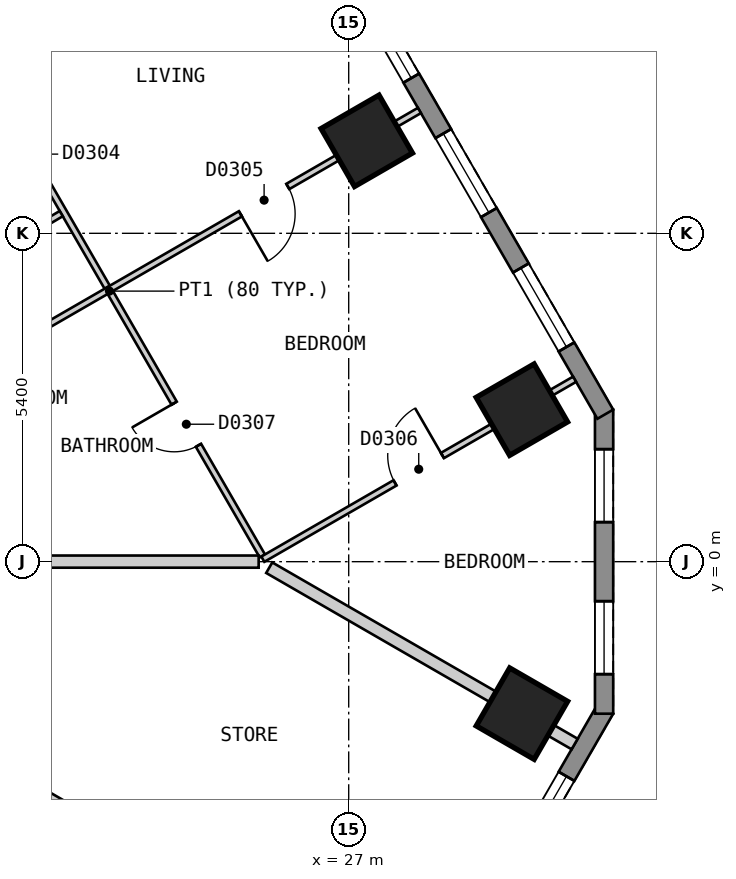
"""IFC4 building model, lengths in metres.
Left out: names, types, materials, properties, quantities, classifications, styles, units other than length and angle.
Written with IfcOpenShell. Run it as: python <this file> out.ifc"""

import sys

from ifc_helpers import new_model, si_unit, direction, frame, frame_2d, origin, origin_2d, place, context, subcontext, project, spatial, polyline, rectangle, outline, extrude, element, fill, save


model = new_model("IFC4")
c1 = context("Model", 3, precision=1e-05, world=origin(), true_north=direction((0.0, 1.0)))
c2 = subcontext(c1, "Body", "Model", "MODEL_VIEW")
j1 = project(units=[si_unit("LENGTHUNIT", "METRE"), si_unit("PLANEANGLEUNIT", "RADIAN")], contexts=[c1])
p1 = place(None, origin())
s1 = spatial("IfcSite", under=j1, at=p1, CompositionType="ELEMENT")
p2 = place(p1, origin())
s2 = spatial("IfcBuilding", under=s1, at=p2, CompositionType="ELEMENT")
p3 = place(p2, frame((0.0, 0.0, 59.4)))
s3 = spatial("IfcBuildingStorey", under=s2, at=p3, CompositionType="ELEMENT", Elevation=59.4)
for number, where, z_axis, x_axis in (
    (1, (29.849, -2.499, 0.0), (0.0, 0.0, 1.0), (0.5, 0.866, 0.0)),
    (2, (29.848, 2.5, 0.0), (0.0, 0.0, 1.0), (-0.5, 0.866, 0.0)),
    (3, (27.297, 6.921, 0.0), (0.0, 0.0, 1.0), (-0.5, 0.866, 0.0)),
):
    element("IfcColumn", number, at=place(p3, frame(where, z_axis=z_axis, x_axis=x_axis)), inside=s3, PredefinedType="COLUMN", context=c2, shape_type="SweptSolid", body=[
        extrude(rectangle(XDim=1.1, YDim=1.1, at=origin_2d()), origin(), (0.0, 0.0, 1.0), 3.0),
    ])
p4 = place(p3, frame((17.71, -25.825, 0.0), z_axis=(0.0, 0.0, 1.0), x_axis=(0.500001938803, 0.866024284413, 0.0)))
e4 = element("IfcWall", 4, at=p4, inside=s3, PredefinedType="SOLIDWALL", context=c2, shape_type="SweptSolid", body=[
    extrude(outline(polyline([(0.0, -0.15), (27.02, -0.15), (26.94, 0.15), (0.08, 0.15), (0.0, -0.15)])), origin(), (0.0, 0.0, 1.0), 2.6),
])
p5 = place(p4, frame((1.277, 0.0, 0.15)))
e5 = element("IfcOpeningElement", 5, at=p5, cuts=e4, PredefinedType="OPENING", context=c2, shape_type="SweptSolid", body=[
    extrude(rectangle(XDim=1.5, YDim=2.1, at=frame_2d((0.75, 1.05))), frame((0.0, 0.16, 0.0), z_axis=(0.0, -1.0, 0.0), x_axis=(1.0, 0.0, 0.0)), (0.0, 0.0, 1.0), 0.32),
])
p6 = place(p4, frame((3.829, 0.0, 0.15)))
e6 = element("IfcOpeningElement", 6, at=p6, cuts=e4, PredefinedType="OPENING", context=c2, shape_type="SweptSolid", body=[
    extrude(rectangle(XDim=1.5, YDim=2.1, at=frame_2d((0.75, 1.05))), frame((0.0, 0.16, 0.0), z_axis=(0.0, -1.0, 0.0), x_axis=(1.0, 0.0, 0.0)), (0.0, 0.0, 1.0), 0.32),
])
p7 = place(p4, frame((6.382, 0.0, 0.15)))
e7 = element("IfcOpeningElement", 7, at=p7, cuts=e4, PredefinedType="OPENING", context=c2, shape_type="SweptSolid", body=[
    extrude(rectangle(XDim=1.5, YDim=2.1, at=frame_2d((0.75, 1.05))), frame((0.0, 0.16, 0.0), z_axis=(0.0, -1.0, 0.0), x_axis=(1.0, 0.0, 0.0)), (0.0, 0.0, 1.0), 0.32),
])
p8 = place(p4, frame((8.933, 0.0, 0.15)))
e8 = element("IfcOpeningElement", 8, at=p8, cuts=e4, PredefinedType="OPENING", context=c2, shape_type="SweptSolid", body=[
    extrude(rectangle(XDim=1.5, YDim=2.1, at=frame_2d((0.75, 1.05))), frame((0.0, 0.16, 0.0), z_axis=(0.0, -1.0, 0.0), x_axis=(1.0, 0.0, 0.0)), (0.0, 0.0, 1.0), 0.32),
])
p9 = place(p4, frame((11.485, 0.0, 0.15)))
e9 = element("IfcOpeningElement", 9, at=p9, cuts=e4, PredefinedType="OPENING", context=c2, shape_type="SweptSolid", body=[
    extrude(rectangle(XDim=1.5, YDim=2.1, at=frame_2d((0.75, 1.05))), frame((0.0, 0.16, 0.0), z_axis=(0.0, -1.0, 0.0), x_axis=(1.0, 0.0, 0.0)), (0.0, 0.0, 1.0), 0.32),
])
p10 = place(p4, frame((14.037, 0.0, 0.15)))
e10 = element("IfcOpeningElement", 10, at=p10, cuts=e4, PredefinedType="OPENING", context=c2, shape_type="SweptSolid", body=[
    extrude(rectangle(XDim=1.5, YDim=2.1, at=frame_2d((0.75, 1.05))), frame((0.0, 0.16, 0.0), z_axis=(0.0, -1.0, 0.0), x_axis=(1.0, 0.0, 0.0)), (0.0, 0.0, 1.0), 0.32),
])
p11 = place(p4, frame((16.589, 0.0, 0.15)))
e11 = element("IfcOpeningElement", 11, at=p11, cuts=e4, PredefinedType="OPENING", context=c2, shape_type="SweptSolid", body=[
    extrude(rectangle(XDim=1.5, YDim=2.1, at=frame_2d((0.75, 1.05))), frame((0.0, 0.16, 0.0), z_axis=(0.0, -1.0, 0.0), x_axis=(1.0, 0.0, 0.0)), (0.0, 0.0, 1.0), 0.32),
])
p12 = place(p4, frame((19.141, 0.0, 0.15)))
e12 = element("IfcOpeningElement", 12, at=p12, cuts=e4, PredefinedType="OPENING", context=c2, shape_type="SweptSolid", body=[
    extrude(rectangle(XDim=1.5, YDim=2.1, at=frame_2d((0.75, 1.05))), frame((0.0, 0.16, 0.0), z_axis=(0.0, -1.0, 0.0), x_axis=(1.0, 0.0, 0.0)), (0.0, 0.0, 1.0), 0.32),
])
p13 = place(p4, frame((21.693, 0.0, 0.15)))
e13 = element("IfcOpeningElement", 13, at=p13, cuts=e4, PredefinedType="OPENING", context=c2, shape_type="SweptSolid", body=[
    extrude(rectangle(XDim=1.5, YDim=2.1, at=frame_2d((0.75, 1.05))), frame((0.0, 0.16, 0.0), z_axis=(0.0, -1.0, 0.0), x_axis=(1.0, 0.0, 0.0)), (0.0, 0.0, 1.0), 0.32),
])
p14 = place(p4, frame((24.244, 0.0, 0.15)))
e14 = element("IfcOpeningElement", 14, at=p14, cuts=e4, PredefinedType="OPENING", context=c2, shape_type="SweptSolid", body=[
    extrude(rectangle(XDim=1.5, YDim=2.1, at=frame_2d((0.75, 1.05))), frame((0.0, 0.16, 0.0), z_axis=(0.0, -1.0, 0.0), x_axis=(1.0, 0.0, 0.0)), (0.0, 0.0, 1.0), 0.32),
])
p15 = place(p3, frame((31.2, -2.5, 0.0), z_axis=(0.0, 0.0, 1.0), x_axis=(0.0, 1.0, 0.0)))
e15 = element("IfcWall", 15, at=p15, inside=s3, PredefinedType="SOLIDWALL", context=c2, shape_type="SweptSolid", body=[
    extrude(outline(polyline([(0.0, -0.15), (5.0, -0.15), (4.92, 0.15), (0.08, 0.15), (0.0, -0.15)])), origin(), (0.0, 0.0, 1.0), 2.6),
])
p16 = place(p15, frame((0.65, 0.0, 0.15)))
e16 = element("IfcOpeningElement", 16, at=p16, cuts=e15, PredefinedType="OPENING", context=c2, shape_type="SweptSolid", body=[
    extrude(rectangle(XDim=1.2, YDim=2.1, at=frame_2d((0.6, 1.05))), frame((0.0, 0.16, 0.0), z_axis=(0.0, -1.0, 0.0), x_axis=(1.0, 0.0, 0.0)), (0.0, 0.0, 1.0), 0.32),
])
p17 = place(p15, frame((3.15, 0.0, 0.15)))
e17 = element("IfcOpeningElement", 17, at=p17, cuts=e15, PredefinedType="OPENING", context=c2, shape_type="SweptSolid", body=[
    extrude(rectangle(XDim=1.2, YDim=2.1, at=frame_2d((0.6, 1.05))), frame((0.0, 0.16, 0.0), z_axis=(0.0, -1.0, 0.0), x_axis=(1.0, 0.0, 0.0)), (0.0, 0.0, 1.0), 0.32),
])
p18 = place(p3, frame((31.22, 2.425, 0.0), z_axis=(0.0, 0.0, 1.0), x_axis=(-0.500001938803, 0.866024284413, 0.0)))
e18 = element("IfcWall", 18, at=p18, inside=s3, PredefinedType="SOLIDWALL", context=c2, shape_type="SweptSolid", body=[
    extrude(outline(polyline([(0.0, -0.15), (27.02, -0.15), (26.94, 0.15), (0.08, 0.15), (0.0, -0.15)])), origin(), (0.0, 0.0, 1.0), 2.6),
])
p19 = place(p18, frame((1.277, 0.0, 0.15)))
e19 = element("IfcOpeningElement", 19, at=p19, cuts=e18, PredefinedType="OPENING", context=c2, shape_type="SweptSolid", body=[
    extrude(rectangle(XDim=1.5, YDim=2.1, at=frame_2d((0.75, 1.05))), frame((0.0, 0.16, 0.0), z_axis=(0.0, -1.0, 0.0), x_axis=(1.0, 0.0, 0.0)), (0.0, 0.0, 1.0), 0.32),
])
p20 = place(p18, frame((3.829, 0.0, 0.15)))
e20 = element("IfcOpeningElement", 20, at=p20, cuts=e18, PredefinedType="OPENING", context=c2, shape_type="SweptSolid", body=[
    extrude(rectangle(XDim=1.5, YDim=2.1, at=frame_2d((0.75, 1.05))), frame((0.0, 0.16, 0.0), z_axis=(0.0, -1.0, 0.0), x_axis=(1.0, 0.0, 0.0)), (0.0, 0.0, 1.0), 0.32),
])
p21 = place(p18, frame((6.382, 0.0, 0.15)))
e21 = element("IfcOpeningElement", 21, at=p21, cuts=e18, PredefinedType="OPENING", context=c2, shape_type="SweptSolid", body=[
    extrude(rectangle(XDim=1.5, YDim=2.1, at=frame_2d((0.75, 1.05))), frame((0.0, 0.16, 0.0), z_axis=(0.0, -1.0, 0.0), x_axis=(1.0, 0.0, 0.0)), (0.0, 0.0, 1.0), 0.32),
])
p22 = place(p18, frame((8.933, 0.0, 0.15)))
e22 = element("IfcOpeningElement", 22, at=p22, cuts=e18, PredefinedType="OPENING", context=c2, shape_type="SweptSolid", body=[
    extrude(rectangle(XDim=1.5, YDim=2.1, at=frame_2d((0.75, 1.05))), frame((0.0, 0.16, 0.0), z_axis=(0.0, -1.0, 0.0), x_axis=(1.0, 0.0, 0.0)), (0.0, 0.0, 1.0), 0.32),
])
p23 = place(p18, frame((11.485, 0.0, 0.15)))
e23 = element("IfcOpeningElement", 23, at=p23, cuts=e18, PredefinedType="OPENING", context=c2, shape_type="SweptSolid", body=[
    extrude(rectangle(XDim=1.5, YDim=2.1, at=frame_2d((0.75, 1.05))), frame((0.0, 0.16, 0.0), z_axis=(0.0, -1.0, 0.0), x_axis=(1.0, 0.0, 0.0)), (0.0, 0.0, 1.0), 0.32),
])
p24 = place(p18, frame((14.037, 0.0, 0.15)))
e24 = element("IfcOpeningElement", 24, at=p24, cuts=e18, PredefinedType="OPENING", context=c2, shape_type="SweptSolid", body=[
    extrude(rectangle(XDim=1.5, YDim=2.1, at=frame_2d((0.75, 1.05))), frame((0.0, 0.16, 0.0), z_axis=(0.0, -1.0, 0.0), x_axis=(1.0, 0.0, 0.0)), (0.0, 0.0, 1.0), 0.32),
])
p25 = place(p18, frame((16.589, 0.0, 0.15)))
e25 = element("IfcOpeningElement", 25, at=p25, cuts=e18, PredefinedType="OPENING", context=c2, shape_type="SweptSolid", body=[
    extrude(rectangle(XDim=1.5, YDim=2.1, at=frame_2d((0.75, 1.05))), frame((0.0, 0.16, 0.0), z_axis=(0.0, -1.0, 0.0), x_axis=(1.0, 0.0, 0.0)), (0.0, 0.0, 1.0), 0.32),
])
p26 = place(p18, frame((19.141, 0.0, 0.15)))
e26 = element("IfcOpeningElement", 26, at=p26, cuts=e18, PredefinedType="OPENING", context=c2, shape_type="SweptSolid", body=[
    extrude(rectangle(XDim=1.5, YDim=2.1, at=frame_2d((0.75, 1.05))), frame((0.0, 0.16, 0.0), z_axis=(0.0, -1.0, 0.0), x_axis=(1.0, 0.0, 0.0)), (0.0, 0.0, 1.0), 0.32),
])
p27 = place(p18, frame((21.693, 0.0, 0.15)))
e27 = element("IfcOpeningElement", 27, at=p27, cuts=e18, PredefinedType="OPENING", context=c2, shape_type="SweptSolid", body=[
    extrude(rectangle(XDim=1.5, YDim=2.1, at=frame_2d((0.75, 1.05))), frame((0.0, 0.16, 0.0), z_axis=(0.0, -1.0, 0.0), x_axis=(1.0, 0.0, 0.0)), (0.0, 0.0, 1.0), 0.32),
])
p28 = place(p18, frame((24.244, 0.0, 0.15)))
e28 = element("IfcOpeningElement", 28, at=p28, cuts=e18, PredefinedType="OPENING", context=c2, shape_type="SweptSolid", body=[
    extrude(rectangle(XDim=1.5, YDim=2.1, at=frame_2d((0.75, 1.05))), frame((0.0, 0.16, 0.0), z_axis=(0.0, -1.0, 0.0), x_axis=(1.0, 0.0, 0.0)), (0.0, 0.0, 1.0), 0.32),
])
p29 = place(p3, frame((20.551, 8.805, 0.0), z_axis=(0.0, 0.0, 1.0), x_axis=(0.499984387913, -0.86603441724, 0.0)))
e29 = element("IfcWall", 29, at=p29, inside=s3, PredefinedType="PARTITIONING", context=c2, shape_type="SweptSolid", body=[
    extrude(rectangle(XDim=10.058, YDim=0.1, at=frame_2d((5.029, 0.0))), origin(), (0.0, 0.0, 1.0), 2.6),
])
p30 = place(p29, frame((1.978, 0.0, 0.0)))
e30 = element("IfcOpeningElement", 30, at=p30, cuts=e29, PredefinedType="OPENING", context=c2, shape_type="SweptSolid", body=[
    extrude(rectangle(XDim=0.9, YDim=2.1, at=frame_2d((0.45, 1.05))), frame((0.0, 0.06, 0.0), z_axis=(0.0, -1.0, 0.0), x_axis=(1.0, 0.0, 0.0)), (0.0, 0.0, 1.0), 0.12),
])
p31 = place(p29, frame((7.157, 0.0, 0.0)))
e31 = element("IfcOpeningElement", 31, at=p31, cuts=e29, PredefinedType="OPENING", context=c2, shape_type="SweptSolid", body=[
    extrude(rectangle(XDim=0.8, YDim=2.1, at=frame_2d((0.4, 1.05))), frame((0.0, 0.06, 0.0), z_axis=(0.0, -1.0, 0.0), x_axis=(1.0, 0.0, 0.0)), (0.0, 0.0, 1.0), 0.12),
])
p32 = place(p3, frame((19.503, 2.421, 0.0), z_axis=(0.0, 0.0, 1.0), x_axis=(0.866083434238, 0.499899474834, 0.0)))
e32 = element("IfcWall", 32, at=p32, inside=s3, PredefinedType="PARTITIONING", context=c2, shape_type="SweptSolid", body=[
    extrude(rectangle(XDim=4.099, YDim=0.1, at=frame_2d((2.049, 0.0))), origin(), (0.0, 0.0, 1.0), 2.6),
])
p33 = place(p3, frame((25.588, 0.041, 0.0), z_axis=(0.0, 0.0, 1.0), x_axis=(0.866113484451, 0.499847408768, 0.0)))
e33 = element("IfcWall", 33, at=p33, inside=s3, PredefinedType="PARTITIONING", context=c2, shape_type="SweptSolid", body=[
    extrude(rectangle(XDim=5.92, YDim=0.1, at=frame_2d((2.96, 0.0))), origin(), (0.0, 0.0, 1.0), 2.6),
])
p34 = place(p33, frame((2.51, 0.0, 0.0)))
e34 = element("IfcOpeningElement", 34, at=p34, cuts=e33, PredefinedType="OPENING", context=c2, shape_type="SweptSolid", body=[
    extrude(rectangle(XDim=0.9, YDim=2.1, at=frame_2d((0.45, 1.05))), frame((0.0, 0.06, 0.0), z_axis=(0.0, -1.0, 0.0), x_axis=(1.0, 0.0, 0.0)), (0.0, 0.0, 1.0), 0.12),
])
p35 = place(p3, frame((18.788, 3.658, 0.0), z_axis=(0.0, 0.0, 1.0), x_axis=(0.860114269096, 0.510101405701, 0.0)))
e35 = element("IfcWall", 35, at=p35, inside=s3, PredefinedType="PARTITIONING", context=c2, shape_type="SweptSolid", body=[
    extrude(rectangle(XDim=4.051, YDim=0.1, at=frame_2d((2.025, 0.0))), origin(), (0.0, 0.0, 1.0), 2.6),
])
p36 = place(p35, frame((1.6, 0.0, 0.0)))
e36 = element("IfcOpeningElement", 36, at=p36, cuts=e35, PredefinedType="OPENING", context=c2, shape_type="SweptSolid", body=[
    extrude(rectangle(XDim=0.8, YDim=2.1, at=frame_2d((0.4, 1.05))), frame((0.0, 0.06, 0.0), z_axis=(0.0, -1.0, 0.0), x_axis=(1.0, 0.0, 0.0)), (0.0, 0.0, 1.0), 0.12),
])
p37 = place(p3, frame((19.503, -2.419, 0.0), z_axis=(0.0, 0.0, 1.0), x_axis=(0.866047370643, -0.499961950354, 0.0)))
e37 = element("IfcWall", 37, at=p37, inside=s3, PredefinedType="PARTITIONING", context=c2, shape_type="SweptSolid", body=[
    extrude(rectangle(XDim=10.001, YDim=0.2, at=frame_2d((5.0, 0.0))), origin(), (0.0, 0.0, 1.0), 2.6),
])
p38 = place(p3, frame((25.693, -0.099, 0.0), z_axis=(0.0, 0.0, 1.0), x_axis=(0.866032775405, -0.499987231761, 0.0)))
e38 = element("IfcWall", 38, at=p38, inside=s3, PredefinedType="PARTITIONING", context=c2, shape_type="SweptSolid", body=[
    extrude(rectangle(XDim=5.8, YDim=0.2, at=frame_2d((2.9, 0.0))), origin(), (0.0, 0.0, 1.0), 2.6),
])
p39 = place(p3, frame((20.784, 0.001, 0.0), z_axis=(0.0, 0.0, 1.0), x_axis=(1.0, 0.0, 0.0)))
e39 = element("IfcWall", 39, at=p39, inside=s3, PredefinedType="PARTITIONING", context=c2, shape_type="SweptSolid", body=[
    extrude(rectangle(XDim=4.735, YDim=0.2, at=frame_2d((2.368, 0.0))), origin(), (0.0, 0.0, 1.0), 2.6),
])
p40 = place(p3, frame((16.95, 6.841, 0.0), z_axis=(0.0, 0.0, 1.0), x_axis=(0.866022959057, 0.500004234368, 0.0)))
e40 = element("IfcWall", 40, at=p40, inside=s3, PredefinedType="PARTITIONING", context=c2, shape_type="SweptSolid", body=[
    extrude(rectangle(XDim=10.0, YDim=0.2, at=frame_2d((5.0, 0.0))), origin(), (0.0, 0.0, 1.0), 2.6),
])
p41 = place(p3, frame((23.053, 4.47, 0.0), z_axis=(0.0, 0.0, 1.0), x_axis=(0.866052608538, 0.499952877023, 0.0)))
e41 = element("IfcWall", 41, at=p41, inside=s3, PredefinedType="PARTITIONING", context=c2, shape_type="SweptSolid", body=[
    extrude(rectangle(XDim=5.9, YDim=0.1, at=frame_2d((2.95, 0.0))), origin(), (0.0, 0.0, 1.0), 2.6),
])
p42 = place(p41, frame((2.501, 0.0, 0.0)))
e42 = element("IfcOpeningElement", 42, at=p42, cuts=e41, PredefinedType="OPENING", context=c2, shape_type="SweptSolid", body=[
    extrude(rectangle(XDim=0.9, YDim=2.1, at=frame_2d((0.45, 1.05))), frame((0.0, 0.06, 0.0), z_axis=(0.0, -1.0, 0.0), x_axis=(1.0, 0.0, 0.0)), (0.0, 0.0, 1.0), 0.12),
])
p43 = place(p14, origin())
e43 = element("IfcWindow", 43, at=p43, inside=s3, PartitioningType="SINGLE_PANEL", PredefinedType="WINDOW", context=c2, shape_type="SweptSolid", body=[
    extrude(rectangle(XDim=1.5, YDim=2.1, at=frame_2d((0.75, 1.05))), frame((0.0, 0.03, 0.0), z_axis=(0.0, -1.0, 0.0), x_axis=(1.0, 0.0, 0.0)), (0.0, 0.0, 1.0), 0.06),
])
fill(e14, e43)
p44 = place(p16, origin())
e44 = element("IfcWindow", 44, at=p44, inside=s3, PartitioningType="SINGLE_PANEL", PredefinedType="WINDOW", context=c2, shape_type="SweptSolid", body=[
    extrude(rectangle(XDim=1.2, YDim=2.1, at=frame_2d((0.6, 1.05))), frame((0.0, 0.03, 0.0), z_axis=(0.0, -1.0, 0.0), x_axis=(1.0, 0.0, 0.0)), (0.0, 0.0, 1.0), 0.06),
])
fill(e16, e44)
p45 = place(p17, origin())
e45 = element("IfcWindow", 45, at=p45, inside=s3, PartitioningType="SINGLE_PANEL", PredefinedType="WINDOW", context=c2, shape_type="SweptSolid", body=[
    extrude(rectangle(XDim=1.2, YDim=2.1, at=frame_2d((0.6, 1.05))), frame((0.0, 0.03, 0.0), z_axis=(0.0, -1.0, 0.0), x_axis=(1.0, 0.0, 0.0)), (0.0, 0.0, 1.0), 0.06),
])
fill(e17, e45)
p46 = place(p19, origin())
e46 = element("IfcWindow", 46, at=p46, inside=s3, PartitioningType="SINGLE_PANEL", PredefinedType="WINDOW", context=c2, shape_type="SweptSolid", body=[
    extrude(rectangle(XDim=1.5, YDim=2.1, at=frame_2d((0.75, 1.05))), frame((0.0, 0.03, 0.0), z_axis=(0.0, -1.0, 0.0), x_axis=(1.0, 0.0, 0.0)), (0.0, 0.0, 1.0), 0.06),
])
fill(e19, e46)
p47 = place(p20, origin())
e47 = element("IfcWindow", 47, at=p47, inside=s3, PartitioningType="SINGLE_PANEL", PredefinedType="WINDOW", context=c2, shape_type="SweptSolid", body=[
    extrude(rectangle(XDim=1.5, YDim=2.1, at=frame_2d((0.75, 1.05))), frame((0.0, 0.03, 0.0), z_axis=(0.0, -1.0, 0.0), x_axis=(1.0, 0.0, 0.0)), (0.0, 0.0, 1.0), 0.06),
])
fill(e20, e47)
p48 = place(p21, origin())
e48 = element("IfcWindow", 48, at=p48, inside=s3, PartitioningType="SINGLE_PANEL", PredefinedType="WINDOW", context=c2, shape_type="SweptSolid", body=[
    extrude(rectangle(XDim=1.5, YDim=2.1, at=frame_2d((0.75, 1.05))), frame((0.0, 0.03, 0.0), z_axis=(0.0, -1.0, 0.0), x_axis=(1.0, 0.0, 0.0)), (0.0, 0.0, 1.0), 0.06),
])
fill(e21, e48)
p49 = place(p42, origin())
e49 = element("IfcDoor", 49, at=p49, inside=s3, OperationType="SINGLE_SWING_LEFT", PredefinedType="DOOR", context=c2, shape_type="SweptSolid", body=[
    extrude(rectangle(XDim=0.9, YDim=2.1, at=frame_2d((0.45, 1.05))), frame((0.0, 0.025, 0.0), z_axis=(0.0, -1.0, 0.0), x_axis=(1.0, 0.0, 0.0)), (0.0, 0.0, 1.0), 0.05),
])
fill(e42, e49)
p50 = place(p34, origin())
e50 = element("IfcDoor", 50, at=p50, inside=s3, OperationType="SINGLE_SWING_RIGHT", PredefinedType="DOOR", context=c2, shape_type="SweptSolid", body=[
    extrude(rectangle(XDim=0.9, YDim=2.1, at=frame_2d((0.45, 1.05))), frame((0.0, 0.025, 0.0), z_axis=(0.0, -1.0, 0.0), x_axis=(1.0, 0.0, 0.0)), (0.0, 0.0, 1.0), 0.05),
])
fill(e34, e50)
p51 = place(p31, origin())
e51 = element("IfcDoor", 51, at=p51, inside=s3, OperationType="SINGLE_SWING_LEFT", PredefinedType="DOOR", context=c2, shape_type="SweptSolid", body=[
    extrude(rectangle(XDim=0.8, YDim=2.1, at=frame_2d((0.4, 1.05))), frame((0.0, 0.025, 0.0), z_axis=(0.0, -1.0, 0.0), x_axis=(1.0, 0.0, 0.0)), (0.0, 0.0, 1.0), 0.05),
])
fill(e31, e51)
save(model, sys.argv[1])
